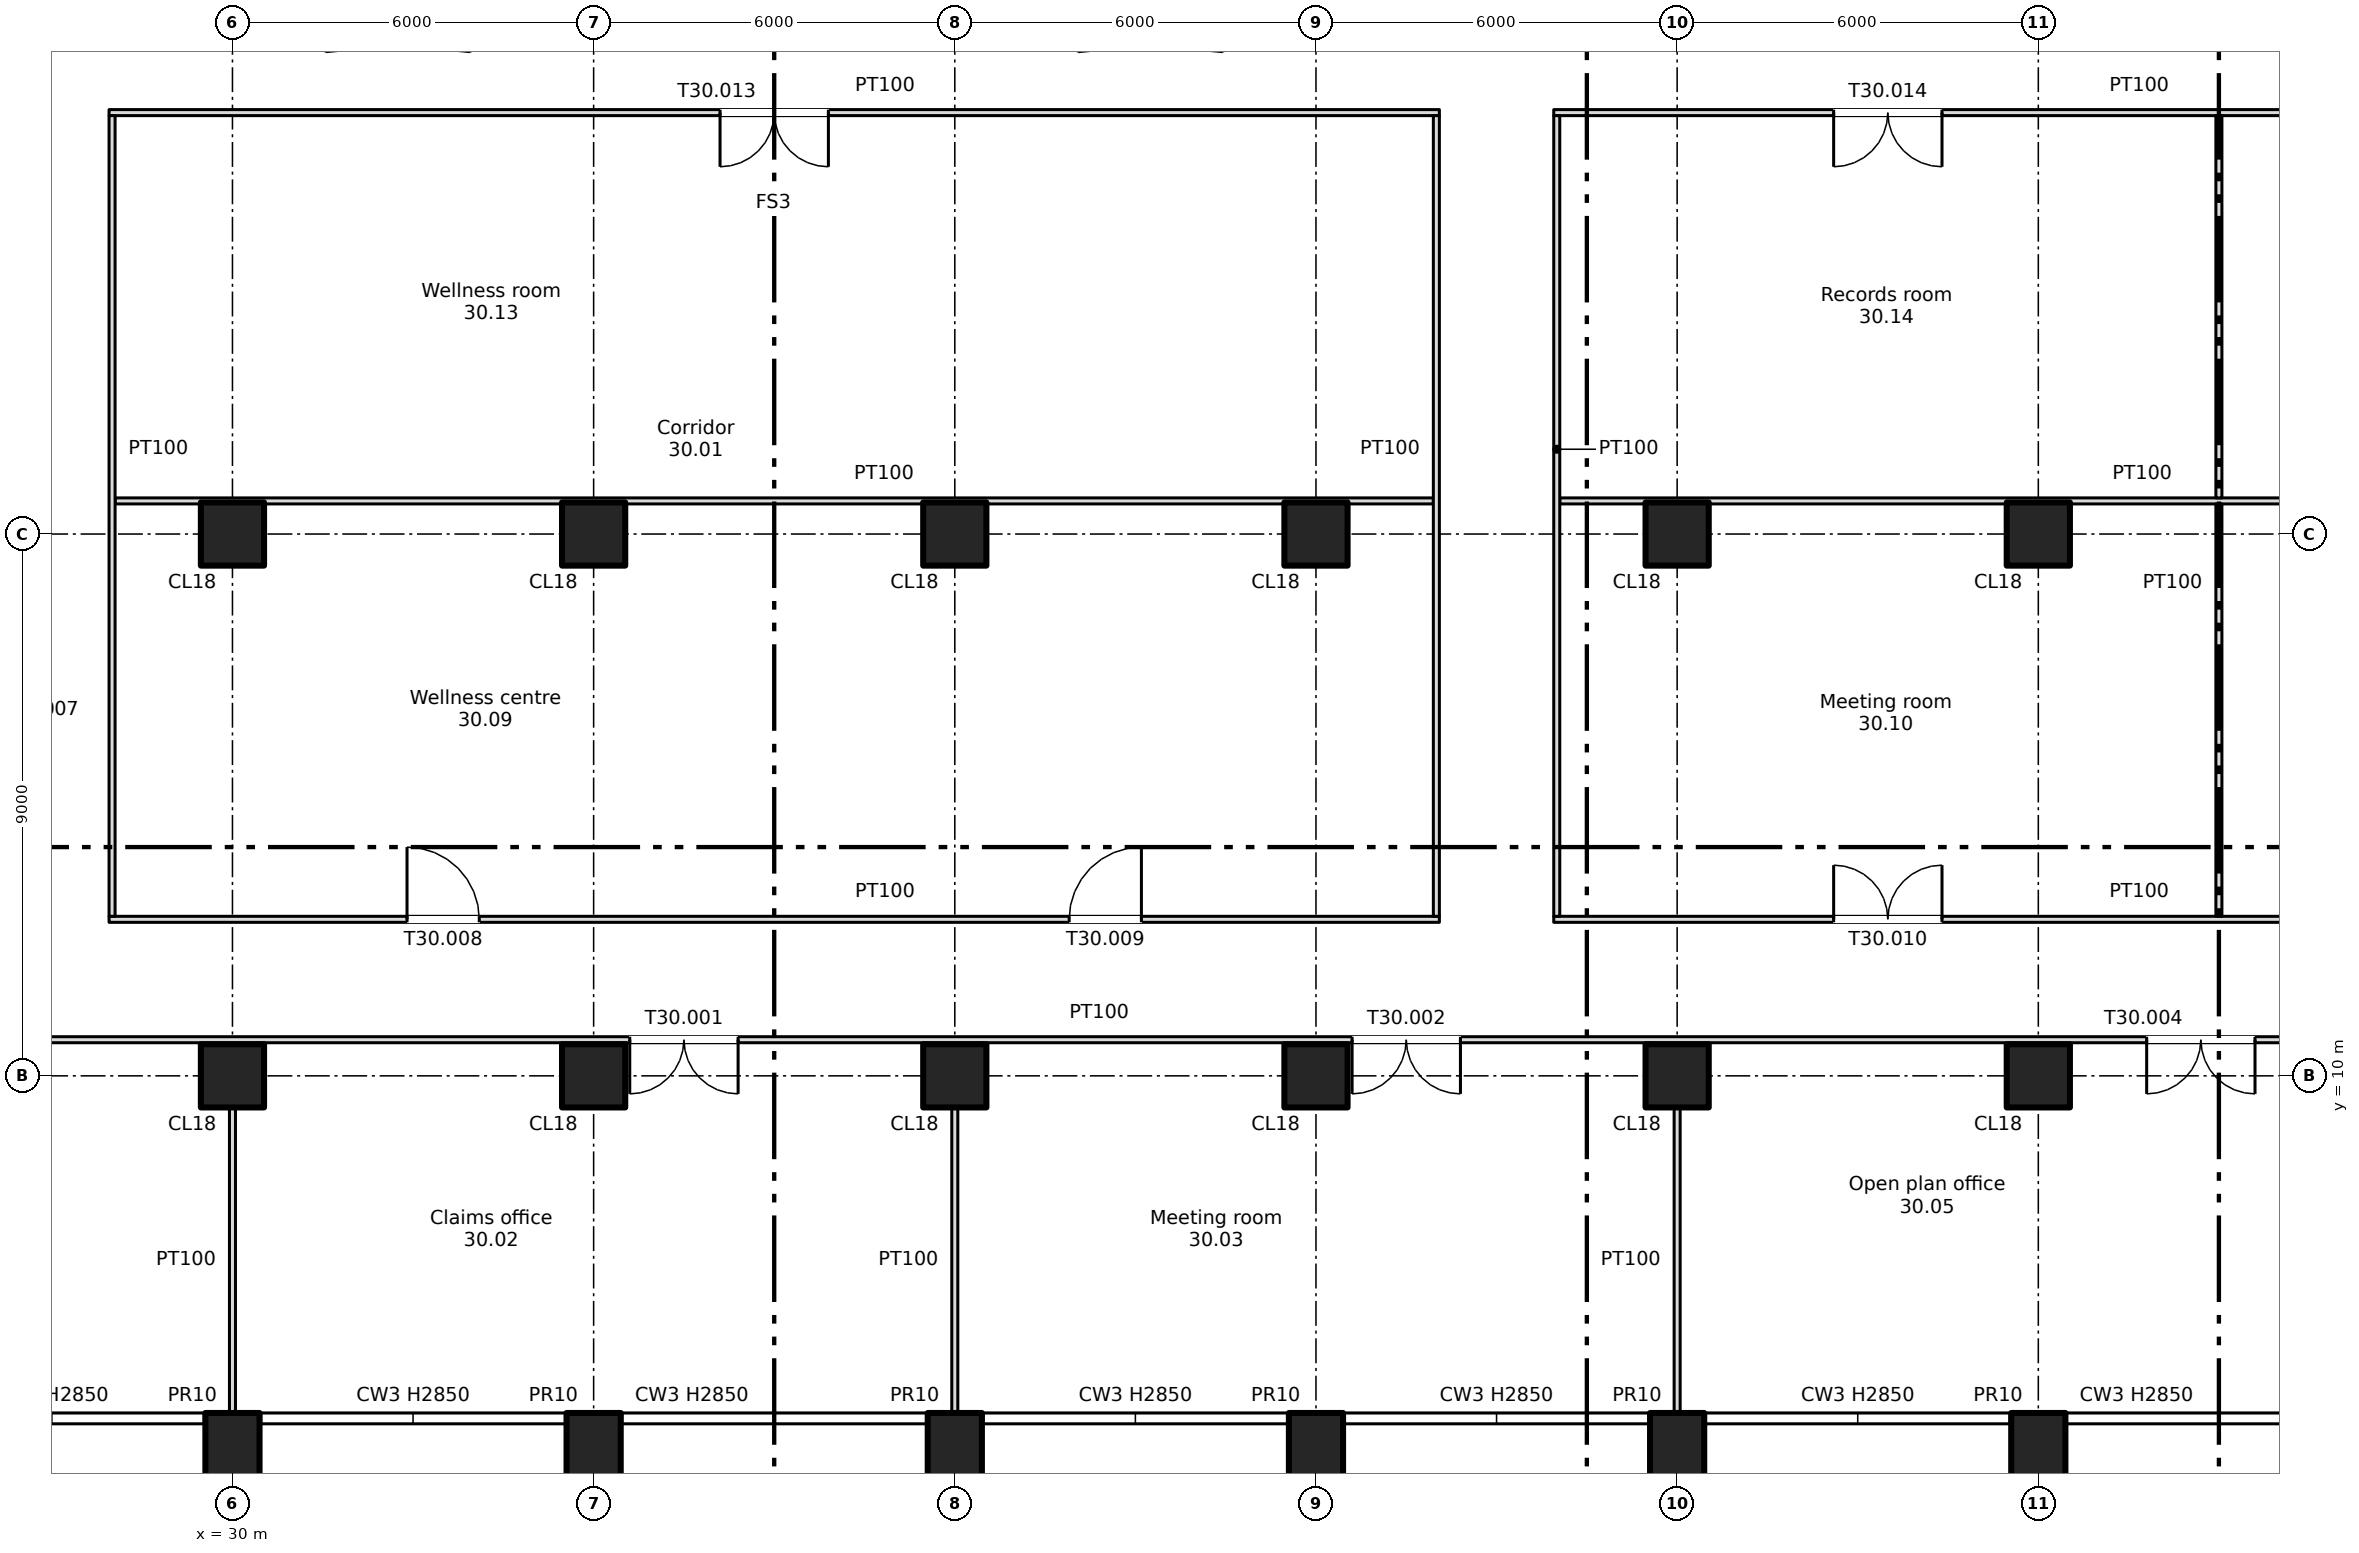
"""IFC4 building model, lengths in metres.
Left out: names, types, materials, properties, quantities, classifications, styles, units other than length and angle.
Written with IfcOpenShell. Run it as: python <this file> out.ifc"""

import sys

from ifc_helpers import new_model, si_unit, direction, frame, frame_2d, origin, origin_2d, place, context, subcontext, project, spatial, rectangle, extrude, element, fill, save


model = new_model("IFC4")
c1 = context("Model", 3, precision=1e-05, world=origin(), true_north=direction((0.0, 1.0)))
c2 = subcontext(c1, "Body", "Model", "MODEL_VIEW")
j1 = project(units=[si_unit("LENGTHUNIT", "METRE"), si_unit("PLANEANGLEUNIT", "RADIAN")], contexts=[c1])
p1 = place(None, origin())
s1 = spatial("IfcSite", under=j1, at=p1, CompositionType="ELEMENT")
p2 = place(p1, origin())
s2 = spatial("IfcBuilding", under=s1, at=p2, CompositionType="ELEMENT")
p3 = place(p2, frame((0.0, 0.0, 208.0)))
s3 = spatial("IfcBuildingStorey", under=s2, at=p3, CompositionType="ELEMENT", Elevation=208.0)
for number, where, z_axis, x_axis in (
    (1, (30.0, 3.7, -0.4), (0.0, 0.0, 1.0), (1.0, 0.0, 0.0)),
    (2, (36.0, 3.7, -0.4), (0.0, 0.0, 1.0), (1.0, 0.0, 0.0)),
    (3, (42.0, 3.7, -0.4), (0.0, 0.0, 1.0), (1.0, 0.0, 0.0)),
    (4, (48.0, 3.7, -0.4), (0.0, 0.0, 1.0), (1.0, 0.0, 0.0)),
    (5, (54.0, 3.7, -0.4), (0.0, 0.0, 1.0), (1.0, 0.0, 0.0)),
    (6, (60.0, 3.7, -0.4), (0.0, 0.0, 1.0), (1.0, 0.0, 0.0)),
):
    element("IfcColumn", number, at=place(p3, frame(where, z_axis=z_axis, x_axis=x_axis)), inside=s3, PredefinedType="COLUMN", context=c2, shape_type="SweptSolid", body=[
        extrude(rectangle(XDim=0.9, YDim=1.4, at=origin_2d()), origin(), (0.0, 0.0, 1.0), 3.75),
    ])
for number, where, z_axis, x_axis in (
    (7, (30.0, 10.0, 0.0), (0.0, 0.0, 1.0), (1.0, 0.0, 0.0)),
    (8, (30.0, 19.0, 0.0), (0.0, 0.0, 1.0), (1.0, 0.0, 0.0)),
    (9, (36.0, 10.0, 0.0), (0.0, 0.0, 1.0), (1.0, 0.0, 0.0)),
    (10, (36.0, 19.0, 0.0), (0.0, 0.0, 1.0), (1.0, 0.0, 0.0)),
    (11, (42.0, 10.0, 0.0), (0.0, 0.0, 1.0), (1.0, 0.0, 0.0)),
    (12, (42.0, 19.0, 0.0), (0.0, 0.0, 1.0), (1.0, 0.0, 0.0)),
    (13, (48.0, 10.0, 0.0), (0.0, 0.0, 1.0), (1.0, 0.0, 0.0)),
    (14, (48.0, 19.0, 0.0), (0.0, 0.0, 1.0), (1.0, 0.0, 0.0)),
    (15, (54.0, 10.0, 0.0), (0.0, 0.0, 1.0), (1.0, 0.0, 0.0)),
    (16, (54.0, 19.0, 0.0), (0.0, 0.0, 1.0), (1.0, 0.0, 0.0)),
    (17, (60.0, 10.0, 0.0), (0.0, 0.0, 1.0), (1.0, 0.0, 0.0)),
    (18, (60.0, 19.0, 0.0), (0.0, 0.0, 1.0), (1.0, 0.0, 0.0)),
):
    element("IfcColumn", number, at=place(p3, frame(where, z_axis=z_axis, x_axis=x_axis)), inside=s3, PredefinedType="COLUMN", context=c2, shape_type="SweptSolid", body=[
        extrude(rectangle(XDim=1.05, YDim=1.05, at=origin_2d()), origin(), (0.0, 0.0, 1.0), 3.35),
    ])
p4 = place(p3, frame((6.6, 10.6, 0.0), z_axis=(0.0, 0.0, 1.0), x_axis=(1.0, 0.0, 0.0)))
e19 = element("IfcWall", 19, at=p4, inside=s3, PredefinedType="PARTITIONING", context=c2, shape_type="SweptSolid", body=[
    extrude(rectangle(XDim=64.8, YDim=0.1, at=frame_2d((32.4, 0.0))), origin(), (0.0, 0.0, 1.0), 3.35),
])
p5 = place(p4, frame((30.0, 0.0, 0.0)))
e20 = element("IfcOpeningElement", 20, at=p5, cuts=e19, PredefinedType="OPENING", context=c2, shape_type="SweptSolid", body=[
    extrude(rectangle(XDim=1.8, YDim=2.1, at=frame_2d((0.9, 1.05))), frame((0.0, 0.06, 0.0), z_axis=(0.0, -1.0, 0.0), x_axis=(1.0, 0.0, 0.0)), (0.0, 0.0, 1.0), 0.12),
])
p6 = place(p4, frame((42.0, 0.0, 0.0)))
e21 = element("IfcOpeningElement", 21, at=p6, cuts=e19, PredefinedType="OPENING", context=c2, shape_type="SweptSolid", body=[
    extrude(rectangle(XDim=1.8, YDim=2.1, at=frame_2d((0.9, 1.05))), frame((0.0, 0.06, 0.0), z_axis=(0.0, -1.0, 0.0), x_axis=(1.0, 0.0, 0.0)), (0.0, 0.0, 1.0), 0.12),
])
p7 = place(p4, frame((12.05, 0.0, 0.0)))
e22 = element("IfcOpeningElement", 22, at=p7, cuts=e19, PredefinedType="OPENING", context=c2, shape_type="SweptSolid", body=[
    extrude(rectangle(XDim=1.8, YDim=2.1, at=frame_2d((0.9, 1.05))), frame((0.0, 0.06, 0.0), z_axis=(0.0, -1.0, 0.0), x_axis=(1.0, 0.0, 0.0)), (0.0, 0.0, 1.0), 0.12),
])
p8 = place(p4, frame((55.2, 0.0, 0.0)))
e23 = element("IfcOpeningElement", 23, at=p8, cuts=e19, PredefinedType="OPENING", context=c2, shape_type="SweptSolid", body=[
    extrude(rectangle(XDim=1.8, YDim=2.1, at=frame_2d((0.9, 1.05))), frame((0.0, 0.06, 0.0), z_axis=(0.0, -1.0, 0.0), x_axis=(1.0, 0.0, 0.0)), (0.0, 0.0, 1.0), 0.12),
])
p9 = place(p3, frame((27.95, 12.6, 0.0), z_axis=(0.0, 0.0, 1.0), x_axis=(1.0, 0.0, 0.0)))
e24 = element("IfcWall", 24, at=p9, inside=s3, PredefinedType="PARTITIONING", context=c2, shape_type="SweptSolid", body=[
    extrude(rectangle(XDim=22.1, YDim=0.1, at=frame_2d((11.05, 0.0))), origin(), (0.0, 0.0, 1.0), 3.35),
])
p10 = place(p9, frame((4.95, 0.0, 0.0)))
e25 = element("IfcOpeningElement", 25, at=p10, cuts=e24, PredefinedType="OPENING", context=c2, shape_type="SweptSolid", body=[
    extrude(rectangle(XDim=1.2, YDim=2.1, at=frame_2d((0.6, 1.05))), frame((0.0, 0.06, 0.0), z_axis=(0.0, -1.0, 0.0), x_axis=(1.0, 0.0, 0.0)), (0.0, 0.0, 1.0), 0.12),
])
p11 = place(p9, frame((15.95, 0.0, 0.0)))
e26 = element("IfcOpeningElement", 26, at=p11, cuts=e24, PredefinedType="OPENING", context=c2, shape_type="SweptSolid", body=[
    extrude(rectangle(XDim=1.2, YDim=2.1, at=frame_2d((0.6, 1.05))), frame((0.0, 0.06, 0.0), z_axis=(0.0, -1.0, 0.0), x_axis=(1.0, 0.0, 0.0)), (0.0, 0.0, 1.0), 0.12),
])
p12 = place(p3, frame((51.95, 12.6, 0.0), z_axis=(0.0, 0.0, 1.0), x_axis=(1.0, 0.0, 0.0)))
e27 = element("IfcWall", 27, at=p12, inside=s3, PredefinedType="PARTITIONING", context=c2, shape_type="SweptSolid", body=[
    extrude(rectangle(XDim=19.45, YDim=0.1, at=frame_2d((9.725, 0.0))), origin(), (0.0, 0.0, 1.0), 3.35),
])
p13 = place(p12, frame((4.65, 0.0, 0.0)))
e28 = element("IfcOpeningElement", 28, at=p13, cuts=e27, PredefinedType="OPENING", context=c2, shape_type="SweptSolid", body=[
    extrude(rectangle(XDim=1.8, YDim=2.1, at=frame_2d((0.9, 1.05))), frame((0.0, 0.06, 0.0), z_axis=(0.0, -1.0, 0.0), x_axis=(1.0, 0.0, 0.0)), (0.0, 0.0, 1.0), 0.12),
])
p14 = place(p12, frame((14.75, 0.0, 0.0)))
e29 = element("IfcOpeningElement", 29, at=p14, cuts=e27, PredefinedType="OPENING", context=c2, shape_type="SweptSolid", body=[
    extrude(rectangle(XDim=1.0, YDim=2.1, at=frame_2d((0.5, 1.05))), frame((0.0, 0.06, 0.0), z_axis=(0.0, -1.0, 0.0), x_axis=(1.0, 0.0, 0.0)), (0.0, 0.0, 1.0), 0.12),
])
p15 = place(p3, frame((28.05, 19.55, 0.0), z_axis=(0.0, 0.0, 1.0), x_axis=(1.0, 0.0, 0.0)))
e30 = element("IfcWall", 30, at=p15, inside=s3, PredefinedType="PARTITIONING", context=c2, shape_type="SweptSolid", body=[
    extrude(rectangle(XDim=21.9, YDim=0.1, at=frame_2d((10.95, 0.0))), origin(), (0.0, 0.0, 1.0), 3.35),
])
p16 = place(p3, frame((52.05, 19.55, 0.0), z_axis=(0.0, 0.0, 1.0), x_axis=(1.0, 0.0, 0.0)))
e31 = element("IfcWall", 31, at=p16, inside=s3, PredefinedType="PARTITIONING", context=c2, shape_type="SweptSolid", body=[
    extrude(rectangle(XDim=19.35, YDim=0.1, at=frame_2d((9.675, 0.0))), origin(), (0.0, 0.0, 1.0), 3.35),
])
p17 = place(p3, frame((27.95, 26.0, 0.0), z_axis=(0.0, 0.0, 1.0), x_axis=(1.0, 0.0, 0.0)))
e32 = element("IfcWall", 32, at=p17, inside=s3, PredefinedType="PARTITIONING", context=c2, shape_type="SweptSolid", body=[
    extrude(rectangle(XDim=22.1, YDim=0.1, at=frame_2d((11.05, 0.0))), origin(), (0.0, 0.0, 1.0), 3.35),
])
p18 = place(p17, frame((10.15, 0.0, 0.0)))
e33 = element("IfcOpeningElement", 33, at=p18, cuts=e32, PredefinedType="OPENING", context=c2, shape_type="SweptSolid", body=[
    extrude(rectangle(XDim=1.8, YDim=2.1, at=frame_2d((0.9, 1.05))), frame((0.0, 0.06, 0.0), z_axis=(0.0, -1.0, 0.0), x_axis=(1.0, 0.0, 0.0)), (0.0, 0.0, 1.0), 0.12),
])
p19 = place(p3, frame((51.95, 26.0, 0.0), z_axis=(0.0, 0.0, 1.0), x_axis=(1.0, 0.0, 0.0)))
e34 = element("IfcWall", 34, at=p19, inside=s3, PredefinedType="PARTITIONING", context=c2, shape_type="SweptSolid", body=[
    extrude(rectangle(XDim=19.45, YDim=0.1, at=frame_2d((9.725, 0.0))), origin(), (0.0, 0.0, 1.0), 3.35),
])
p20 = place(p19, frame((4.65, 0.0, 0.0)))
e35 = element("IfcOpeningElement", 35, at=p20, cuts=e34, PredefinedType="OPENING", context=c2, shape_type="SweptSolid", body=[
    extrude(rectangle(XDim=1.8, YDim=2.1, at=frame_2d((0.9, 1.05))), frame((0.0, 0.06, 0.0), z_axis=(0.0, -1.0, 0.0), x_axis=(1.0, 0.0, 0.0)), (0.0, 0.0, 1.0), 0.12),
])
p21 = place(p19, frame((14.75, 0.0, 0.0)))
e36 = element("IfcOpeningElement", 36, at=p21, cuts=e34, PredefinedType="OPENING", context=c2, shape_type="SweptSolid", body=[
    extrude(rectangle(XDim=1.0, YDim=2.1, at=frame_2d((0.5, 1.05))), frame((0.0, 0.06, 0.0), z_axis=(0.0, -1.0, 0.0), x_axis=(1.0, 0.0, 0.0)), (0.0, 0.0, 1.0), 0.12),
])
p22 = place(p3, frame((28.0, 12.65, 0.0), z_axis=(0.0, 0.0, 1.0), x_axis=(0.0, 1.0, 0.0)))
e37 = element("IfcWall", 37, at=p22, inside=s3, PredefinedType="PARTITIONING", context=c2, shape_type="SweptSolid", body=[
    extrude(rectangle(XDim=13.3, YDim=0.1, at=frame_2d((6.65, 0.0))), origin(), (0.0, 0.0, 1.0), 3.35),
])
for number, where, z_axis, x_axis in (
    (38, (30.0, 4.4, 0.0), (0.0, 0.0, 1.0), (0.0, 1.0, 0.0)),
    (39, (42.0, 4.4, 0.0), (0.0, 0.0, 1.0), (0.0, 1.0, 0.0)),
):
    element("IfcWall", number, at=place(p3, frame(where, z_axis=z_axis, x_axis=x_axis)), inside=s3, PredefinedType="PARTITIONING", context=c2, shape_type="SweptSolid", body=[
        extrude(rectangle(XDim=5.075, YDim=0.1, at=frame_2d((2.538, 0.0))), origin(), (0.0, 0.0, 1.0), 3.35),
    ])
for number, where, z_axis, x_axis in (
    (40, (50.0, 12.65, 0.0), (0.0, 0.0, 1.0), (0.0, 1.0, 0.0)),
    (41, (52.0, 12.65, 0.0), (0.0, 0.0, 1.0), (0.0, 1.0, 0.0)),
):
    element("IfcWall", number, at=place(p3, frame(where, z_axis=z_axis, x_axis=x_axis)), inside=s3, PredefinedType="PARTITIONING", context=c2, shape_type="SweptSolid", body=[
        extrude(rectangle(XDim=13.3, YDim=0.1, at=frame_2d((6.65, 0.0))), origin(), (0.0, 0.0, 1.0), 3.35),
    ])
p23 = place(p3, frame((54.0, 4.4, 0.0), z_axis=(0.0, 0.0, 1.0), x_axis=(0.0, 1.0, 0.0)))
e42 = element("IfcWall", 42, at=p23, inside=s3, PredefinedType="PARTITIONING", context=c2, shape_type="SweptSolid", body=[
    extrude(rectangle(XDim=5.075, YDim=0.1, at=frame_2d((2.538, 0.0))), origin(), (0.0, 0.0, 1.0), 3.35),
])
p24 = place(p3, frame((63.0, 12.65, 0.0), z_axis=(0.0, 0.0, 1.0), x_axis=(0.0, 1.0, 0.0)))
e43 = element("IfcWall", 43, at=p24, inside=s3, PredefinedType="PARTITIONING", context=c2, shape_type="SweptSolid", body=[
    extrude(rectangle(XDim=6.85, YDim=0.1, at=frame_2d((3.425, 0.0))), origin(), (0.0, 0.0, 1.0), 3.35),
])
p25 = place(p3, frame((63.0, 19.6, 0.0), z_axis=(0.0, 0.0, 1.0), x_axis=(0.0, 1.0, 0.0)))
e44 = element("IfcWall", 44, at=p25, inside=s3, PredefinedType="PARTITIONING", context=c2, shape_type="SweptSolid", body=[
    extrude(rectangle(XDim=6.35, YDim=0.1, at=frame_2d((3.175, 0.0))), origin(), (0.0, 0.0, 1.0), 3.35),
])
p26 = place(p5, origin())
e45 = element("IfcDoor", 45, at=p26, inside=s3, OperationType="DOUBLE_DOOR_SINGLE_SWING", PredefinedType="DOOR", context=c2, shape_type="SweptSolid", body=[
    extrude(rectangle(XDim=1.8, YDim=2.1, at=frame_2d((0.9, 1.05))), frame((0.0, 0.025, 0.0), z_axis=(0.0, -1.0, 0.0), x_axis=(1.0, 0.0, 0.0)), (0.0, 0.0, 1.0), 0.05),
])
fill(e20, e45)
p27 = place(p6, origin())
e46 = element("IfcDoor", 46, at=p27, inside=s3, OperationType="DOUBLE_DOOR_SINGLE_SWING", PredefinedType="DOOR", context=c2, shape_type="SweptSolid", body=[
    extrude(rectangle(XDim=1.8, YDim=2.1, at=frame_2d((0.9, 1.05))), frame((0.0, 0.025, 0.0), z_axis=(0.0, -1.0, 0.0), x_axis=(1.0, 0.0, 0.0)), (0.0, 0.0, 1.0), 0.05),
])
fill(e21, e46)
p28 = place(p8, origin())
e47 = element("IfcDoor", 47, at=p28, inside=s3, OperationType="DOUBLE_DOOR_SINGLE_SWING", PredefinedType="DOOR", context=c2, shape_type="SweptSolid", body=[
    extrude(rectangle(XDim=1.8, YDim=2.1, at=frame_2d((0.9, 1.05))), frame((0.0, 0.025, 0.0), z_axis=(0.0, -1.0, 0.0), x_axis=(1.0, 0.0, 0.0)), (0.0, 0.0, 1.0), 0.05),
])
fill(e23, e47)
p29 = place(p10, origin())
e48 = element("IfcDoor", 48, at=p29, inside=s3, OperationType="SINGLE_SWING_LEFT", PredefinedType="DOOR", context=c2, shape_type="SweptSolid", body=[
    extrude(rectangle(XDim=1.2, YDim=2.1, at=frame_2d((0.6, 1.05))), frame((0.0, 0.025, 0.0), z_axis=(0.0, -1.0, 0.0), x_axis=(1.0, 0.0, 0.0)), (0.0, 0.0, 1.0), 0.05),
])
fill(e25, e48)
p30 = place(p11, origin())
e49 = element("IfcDoor", 49, at=p30, inside=s3, OperationType="SINGLE_SWING_RIGHT", PredefinedType="DOOR", context=c2, shape_type="SweptSolid", body=[
    extrude(rectangle(XDim=1.2, YDim=2.1, at=frame_2d((0.6, 1.05))), frame((0.0, 0.025, 0.0), z_axis=(0.0, -1.0, 0.0), x_axis=(1.0, 0.0, 0.0)), (0.0, 0.0, 1.0), 0.05),
])
fill(e26, e49)
p31 = place(p13, origin())
e50 = element("IfcDoor", 50, at=p31, inside=s3, OperationType="DOUBLE_DOOR_SINGLE_SWING", PredefinedType="DOOR", context=c2, shape_type="SweptSolid", body=[
    extrude(rectangle(XDim=1.8, YDim=2.1, at=frame_2d((0.9, 1.05))), frame((0.0, 0.025, 0.0), z_axis=(0.0, -1.0, 0.0), x_axis=(1.0, 0.0, 0.0)), (0.0, 0.0, 1.0), 0.05),
])
fill(e28, e50)
p32 = place(p18, origin())
e51 = element("IfcDoor", 51, at=p32, inside=s3, OperationType="DOUBLE_DOOR_SINGLE_SWING", PredefinedType="DOOR", context=c2, shape_type="SweptSolid", body=[
    extrude(rectangle(XDim=1.8, YDim=2.1, at=frame_2d((0.9, 1.05))), frame((0.0, 0.025, 0.0), z_axis=(0.0, -1.0, 0.0), x_axis=(1.0, 0.0, 0.0)), (0.0, 0.0, 1.0), 0.05),
])
fill(e33, e51)
p33 = place(p20, origin())
e52 = element("IfcDoor", 52, at=p33, inside=s3, OperationType="DOUBLE_DOOR_SINGLE_SWING", PredefinedType="DOOR", context=c2, shape_type="SweptSolid", body=[
    extrude(rectangle(XDim=1.8, YDim=2.1, at=frame_2d((0.9, 1.05))), frame((0.0, 0.025, 0.0), z_axis=(0.0, -1.0, 0.0), x_axis=(1.0, 0.0, 0.0)), (0.0, 0.0, 1.0), 0.05),
])
fill(e35, e52)
save(model, sys.argv[1])
